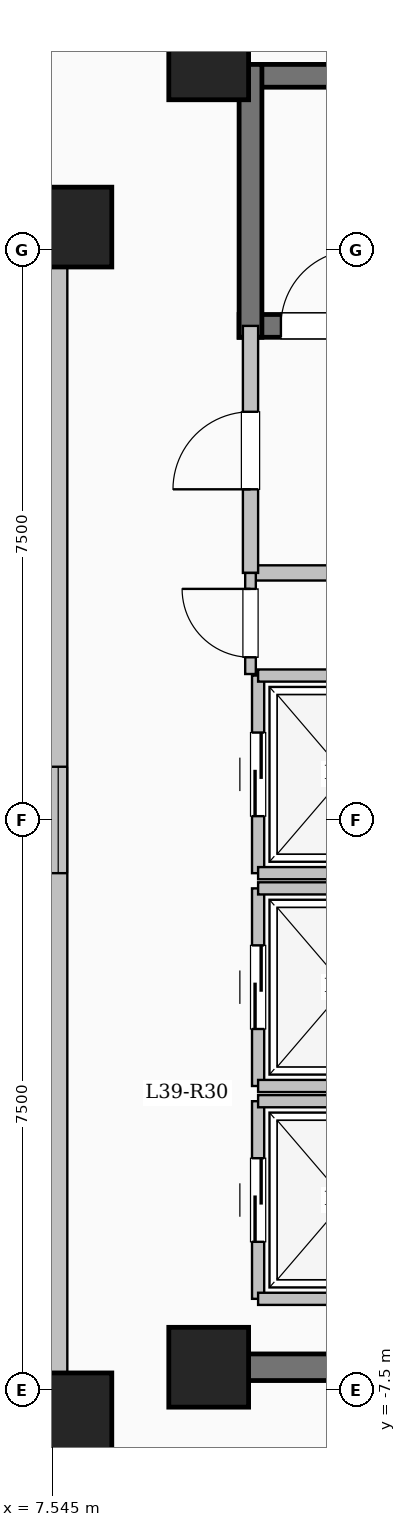
"""IFC4 building model, lengths in metres.
Left out: names, types, materials, properties, quantities, classifications, styles, units other than length and angle.
Written with IfcOpenShell. Run it as: python <this file> out.ifc"""

import sys

from ifc_helpers import new_model, si_unit, direction, frame, frame_2d, origin, origin_2d, place, context, subcontext, project, spatial, rectangle, extrude, element, fill, save


model = new_model("IFC4")
c1 = context("Model", 3, precision=1e-05, world=origin(), true_north=direction((0.0, 1.0)))
c2 = subcontext(c1, "Body", "Model", "MODEL_VIEW")
j1 = project(units=[si_unit("LENGTHUNIT", "METRE"), si_unit("PLANEANGLEUNIT", "RADIAN")], contexts=[c1])
p1 = place(None, origin())
s1 = spatial("IfcSite", under=j1, at=p1, CompositionType="ELEMENT")
p2 = place(p1, origin())
s2 = spatial("IfcBuilding", under=s1, at=p2, CompositionType="ELEMENT")
p3 = place(p2, frame((0.0, 0.0, 146.0)))
s3 = spatial("IfcBuildingStorey", under=s2, at=p3, CompositionType="ELEMENT", Elevation=146.0)
for number, where, z_axis, x_axis in (
    (1, (7.8, -7.8, 0.0), (0.0, 0.0, 1.0), (1.0, 0.0, 0.0)),
    (2, (7.8, 7.8, 0.0), (0.0, 0.0, 1.0), (1.0, 0.0, 0.0)),
    (3, (9.6, -7.2, 0.0), (0.0, 0.0, 1.0), (1.0, 0.0, 0.0)),
    (4, (9.6, 10.0, 0.0), (0.0, 0.0, 1.0), (1.0, 0.0, 0.0)),
):
    element("IfcColumn", number, at=place(p3, frame(where, z_axis=z_axis, x_axis=x_axis)), inside=s3, PredefinedType="COLUMN", context=c2, shape_type="SweptSolid", body=[
        extrude(rectangle(XDim=1.05, YDim=1.05, at=origin_2d()), origin(), (0.0, 0.0, 1.0), 3.35),
    ])
p4 = place(p3, frame((-7.62, -7.62, 0.0), z_axis=(0.0, 0.0, 1.0), x_axis=(1.0, 0.0, 0.0)))
e5 = element("IfcWall", 5, at=p4, inside=s3, PredefinedType="SOLIDWALL", context=c2, shape_type="SweptSolid", body=[
    extrude(rectangle(XDim=15.24, YDim=0.24, at=frame_2d((7.62, 0.0))), origin(), (0.0, 0.0, 1.0), 3.1),
])
p5 = place(p4, frame((6.92, 0.0, 0.95)))
e6 = element("IfcOpeningElement", 6, at=p5, cuts=e5, PredefinedType="OPENING", context=c2, shape_type="SweptSolid", body=[
    extrude(rectangle(XDim=1.4, YDim=1.5, at=frame_2d((0.7, 0.75))), frame((0.0, 0.13, 0.0), z_axis=(0.0, -1.0, 0.0), x_axis=(1.0, 0.0, 0.0)), (0.0, 0.0, 1.0), 0.26),
])
p6 = place(p3, frame((7.62, -7.62, 0.0), z_axis=(0.0, 0.0, 1.0), x_axis=(0.0, 1.0, 0.0)))
e7 = element("IfcWall", 7, at=p6, inside=s3, PredefinedType="SOLIDWALL", context=c2, shape_type="SweptSolid", body=[
    extrude(rectangle(XDim=15.24, YDim=0.24, at=frame_2d((7.62, 0.0))), origin(), (0.0, 0.0, 1.0), 3.1),
])
p7 = place(p6, frame((6.92, 0.0, 0.95)))
e8 = element("IfcOpeningElement", 8, at=p7, cuts=e7, PredefinedType="OPENING", context=c2, shape_type="SweptSolid", body=[
    extrude(rectangle(XDim=1.4, YDim=1.5, at=frame_2d((0.7, 0.75))), frame((0.0, 0.13, 0.0), z_axis=(0.0, -1.0, 0.0), x_axis=(1.0, 0.0, 0.0)), (0.0, 0.0, 1.0), 0.26),
])
p8 = place(p3, frame((7.62, 7.62, 0.0), z_axis=(0.0, 0.0, 1.0), x_axis=(-1.0, 0.0, 0.0)))
e9 = element("IfcWall", 9, at=p8, inside=s3, PredefinedType="SOLIDWALL", context=c2, shape_type="SweptSolid", body=[
    extrude(rectangle(XDim=15.24, YDim=0.24, at=frame_2d((7.62, 0.0))), origin(), (0.0, 0.0, 1.0), 3.1),
])
p9 = place(p8, frame((6.92, 0.0, 0.95)))
e10 = element("IfcOpeningElement", 10, at=p9, cuts=e9, PredefinedType="OPENING", context=c2, shape_type="SweptSolid", body=[
    extrude(rectangle(XDim=1.4, YDim=1.5, at=frame_2d((0.7, 0.75))), frame((0.0, 0.13, 0.0), z_axis=(0.0, -1.0, 0.0), x_axis=(1.0, 0.0, 0.0)), (0.0, 0.0, 1.0), 0.26),
])
p10 = place(p3, frame((10.0, 9.79, 0.0), z_axis=(0.0, 0.0, 1.0), x_axis=(1.0, 0.0, 0.0)))
e11 = element("IfcWall", 11, at=p10, inside=s3, PredefinedType="SHEAR", context=c2, shape_type="SweptSolid", body=[
    extrude(rectangle(XDim=8.0, YDim=0.3, at=frame_2d((4.0, 0.0))), origin(), (0.0, 0.0, 1.0), 3.35),
])
p11 = place(p3, frame((10.0, 6.5, 0.0), z_axis=(0.0, 0.0, 1.0), x_axis=(1.0, 0.0, 0.0)))
e12 = element("IfcWall", 12, at=p11, inside=s3, PredefinedType="SHEAR", context=c2, shape_type="SweptSolid", body=[
    extrude(rectangle(XDim=8.0, YDim=0.3, at=frame_2d((4.0, 0.0))), origin(), (0.0, 0.0, 1.0), 3.35),
])
p12 = place(p11, frame((0.55, 0.0, 0.0)))
e13 = element("IfcOpeningElement", 13, at=p12, cuts=e12, PredefinedType="OPENING", context=c2, shape_type="SweptSolid", body=[
    extrude(rectangle(XDim=1.0, YDim=2.15, at=frame_2d((0.5, 1.075))), frame((0.0, 0.16, 0.0), z_axis=(0.0, -1.0, 0.0), x_axis=(1.0, 0.0, 0.0)), (0.0, 0.0, 1.0), 0.32),
])
p13 = place(p3, frame((10.15, 6.35, 0.0), z_axis=(0.0, 0.0, 1.0), x_axis=(0.0, 1.0, 0.0)))
e14 = element("IfcWall", 14, at=p13, inside=s3, PredefinedType="SHEAR", context=c2, shape_type="SweptSolid", body=[
    extrude(rectangle(XDim=3.59, YDim=0.3, at=frame_2d((1.795, 0.0))), origin(), (0.0, 0.0, 1.0), 3.35),
])
p14 = place(p3, frame((10.15, 3.25, 0.0), z_axis=(0.0, 0.0, 1.0), x_axis=(1.0, 0.0, 0.0)))
e15 = element("IfcWall", 15, at=p14, inside=s3, PredefinedType="SOLIDWALL", context=c2, shape_type="SweptSolid", body=[
    extrude(rectangle(XDim=5.4, YDim=0.2, at=frame_2d((2.7, 0.0))), origin(), (0.0, 0.0, 1.0), 3.1),
])
p15 = place(p3, frame((10.15, 3.25, 0.0), z_axis=(0.0, 0.0, 1.0), x_axis=(0.0, 1.0, 0.0)))
e16 = element("IfcWall", 16, at=p15, inside=s3, PredefinedType="SOLIDWALL", context=c2, shape_type="SweptSolid", body=[
    extrude(rectangle(XDim=3.25, YDim=0.2, at=frame_2d((1.625, 0.0))), origin(), (0.0, 0.0, 1.0), 3.1),
])
p16 = place(p15, frame((1.1, 0.0, 0.0)))
e17 = element("IfcOpeningElement", 17, at=p16, cuts=e16, PredefinedType="OPENING", context=c2, shape_type="SweptSolid", body=[
    extrude(rectangle(XDim=1.02, YDim=2.15, at=frame_2d((0.51, 1.075))), frame((0.0, 0.11, 0.0), z_axis=(0.0, -1.0, 0.0), x_axis=(1.0, 0.0, 0.0)), (0.0, 0.0, 1.0), 0.22),
])
p17 = place(p3, frame((10.25, -6.3, 0.0), z_axis=(0.0, 0.0, 1.0), x_axis=(0.0, 1.0, 0.0)))
e18 = element("IfcWall", 18, at=p17, inside=s3, PredefinedType="SOLIDWALL", context=c2, shape_type="SweptSolid", body=[
    extrude(rectangle(XDim=2.6, YDim=0.16, at=frame_2d((1.3, 0.0))), origin(), (0.0, 0.0, 1.0), 3.1),
])
p18 = place(p17, frame((0.75, 0.0, 0.0)))
e19 = element("IfcOpeningElement", 19, at=p18, cuts=e18, PredefinedType="OPENING", context=c2, shape_type="SweptSolid", body=[
    extrude(rectangle(XDim=1.1, YDim=2.15, at=frame_2d((0.55, 1.075))), frame((0.0, 0.09, 0.0), z_axis=(0.0, -1.0, 0.0), x_axis=(1.0, 0.0, 0.0)), (0.0, 0.0, 1.0), 0.18),
])
for number, where, z_axis, x_axis in (
    (20, (10.25, -6.3, 0.0), (0.0, 0.0, 1.0), (1.0, 0.0, 0.0)),
    (21, (10.25, -3.7, 0.0), (0.0, 0.0, 1.0), (1.0, 0.0, 0.0)),
):
    element("IfcWall", number, at=place(p3, frame(where, z_axis=z_axis, x_axis=x_axis)), inside=s3, PredefinedType="SOLIDWALL", context=c2, shape_type="SweptSolid", body=[
        extrude(rectangle(XDim=2.3, YDim=0.16, at=frame_2d((1.15, 0.0))), origin(), (0.0, 0.0, 1.0), 3.1),
    ])
p19 = place(p3, frame((10.25, -3.5, 0.0), z_axis=(0.0, 0.0, 1.0), x_axis=(0.0, 1.0, 0.0)))
e22 = element("IfcWall", 22, at=p19, inside=s3, PredefinedType="SOLIDWALL", context=c2, shape_type="SweptSolid", body=[
    extrude(rectangle(XDim=2.6, YDim=0.16, at=frame_2d((1.3, 0.0))), origin(), (0.0, 0.0, 1.0), 3.1),
])
p20 = place(p19, frame((0.75, 0.0, 0.0)))
e23 = element("IfcOpeningElement", 23, at=p20, cuts=e22, PredefinedType="OPENING", context=c2, shape_type="SweptSolid", body=[
    extrude(rectangle(XDim=1.1, YDim=2.15, at=frame_2d((0.55, 1.075))), frame((0.0, 0.09, 0.0), z_axis=(0.0, -1.0, 0.0), x_axis=(1.0, 0.0, 0.0)), (0.0, 0.0, 1.0), 0.18),
])
for number, where, z_axis, x_axis in (
    (24, (10.25, -3.5, 0.0), (0.0, 0.0, 1.0), (1.0, 0.0, 0.0)),
    (25, (10.25, -0.9, 0.0), (0.0, 0.0, 1.0), (1.0, 0.0, 0.0)),
):
    element("IfcWall", number, at=place(p3, frame(where, z_axis=z_axis, x_axis=x_axis)), inside=s3, PredefinedType="SOLIDWALL", context=c2, shape_type="SweptSolid", body=[
        extrude(rectangle(XDim=2.3, YDim=0.16, at=frame_2d((1.15, 0.0))), origin(), (0.0, 0.0, 1.0), 3.1),
    ])
p21 = place(p3, frame((10.25, -0.7, 0.0), z_axis=(0.0, 0.0, 1.0), x_axis=(0.0, 1.0, 0.0)))
e26 = element("IfcWall", 26, at=p21, inside=s3, PredefinedType="SOLIDWALL", context=c2, shape_type="SweptSolid", body=[
    extrude(rectangle(XDim=2.6, YDim=0.16, at=frame_2d((1.3, 0.0))), origin(), (0.0, 0.0, 1.0), 3.1),
])
p22 = place(p21, frame((0.75, 0.0, 0.0)))
e27 = element("IfcOpeningElement", 27, at=p22, cuts=e26, PredefinedType="OPENING", context=c2, shape_type="SweptSolid", body=[
    extrude(rectangle(XDim=1.1, YDim=2.15, at=frame_2d((0.55, 1.075))), frame((0.0, 0.09, 0.0), z_axis=(0.0, -1.0, 0.0), x_axis=(1.0, 0.0, 0.0)), (0.0, 0.0, 1.0), 0.18),
])
for number, where, z_axis, x_axis in (
    (28, (10.25, -0.7, 0.0), (0.0, 0.0, 1.0), (1.0, 0.0, 0.0)),
    (29, (10.25, 1.9, 0.0), (0.0, 0.0, 1.0), (1.0, 0.0, 0.0)),
):
    element("IfcWall", number, at=place(p3, frame(where, z_axis=z_axis, x_axis=x_axis)), inside=s3, PredefinedType="SOLIDWALL", context=c2, shape_type="SweptSolid", body=[
        extrude(rectangle(XDim=2.3, YDim=0.16, at=frame_2d((1.15, 0.0))), origin(), (0.0, 0.0, 1.0), 3.1),
    ])
p23 = place(p3, frame((10.075, -7.2, 0.0), z_axis=(0.0, 0.0, 1.0), x_axis=(1.0, 0.0, 0.0)))
e30 = element("IfcWall", 30, at=p23, inside=s3, PredefinedType="SHEAR", context=c2, shape_type="SweptSolid", body=[
    extrude(rectangle(XDim=8.55, YDim=0.35, at=frame_2d((4.275, 0.0))), origin(), (0.0, 0.0, 1.0), 3.35),
])
p24 = place(p3, frame((10.15, 1.92, 0.0), z_axis=(0.0, 0.0, 1.0), x_axis=(0.0, 1.0, 0.0)))
e31 = element("IfcWall", 31, at=p24, inside=s3, PredefinedType="PARTITIONING", context=c2, shape_type="SweptSolid", body=[
    extrude(rectangle(XDim=1.33, YDim=0.14, at=frame_2d((0.665, 0.0))), origin(), (0.0, 0.0, 1.0), 3.1),
])
p25 = place(p24, frame((0.22, 0.0, 0.0)))
e32 = element("IfcOpeningElement", 32, at=p25, cuts=e31, PredefinedType="OPENING", context=c2, shape_type="SweptSolid", body=[
    extrude(rectangle(XDim=0.9, YDim=2.08, at=frame_2d((0.45, 1.04))), frame((0.0, 0.08, 0.0), z_axis=(0.0, -1.0, 0.0), x_axis=(1.0, 0.0, 0.0)), (0.0, 0.0, 1.0), 0.16),
])
p26 = place(p7, origin())
e33 = element("IfcWindow", 33, at=p26, inside=s3, PartitioningType="SINGLE_PANEL", PredefinedType="WINDOW", context=c2, shape_type="SweptSolid", body=[
    extrude(rectangle(XDim=1.4, YDim=1.5, at=frame_2d((0.7, 0.75))), frame((0.0, 0.03, 0.0), z_axis=(0.0, -1.0, 0.0), x_axis=(1.0, 0.0, 0.0)), (0.0, 0.0, 1.0), 0.06),
])
fill(e8, e33)
p27 = place(p12, origin())
e34 = element("IfcDoor", 34, at=p27, inside=s3, OperationType="SINGLE_SWING_RIGHT", PredefinedType="DOOR", context=c2, shape_type="SweptSolid", body=[
    extrude(rectangle(XDim=1.0, YDim=2.15, at=frame_2d((0.5, 1.075))), frame((0.0, 0.025, 0.0), z_axis=(0.0, -1.0, 0.0), x_axis=(1.0, 0.0, 0.0)), (0.0, 0.0, 1.0), 0.05),
])
fill(e13, e34)
p28 = place(p16, origin())
e35 = element("IfcDoor", 35, at=p28, inside=s3, OperationType="SINGLE_SWING_LEFT", PredefinedType="DOOR", context=c2, shape_type="SweptSolid", body=[
    extrude(rectangle(XDim=1.02, YDim=2.15, at=frame_2d((0.51, 1.075))), frame((0.0, 0.025, 0.0), z_axis=(0.0, -1.0, 0.0), x_axis=(1.0, 0.0, 0.0)), (0.0, 0.0, 1.0), 0.05),
])
fill(e17, e35)
p29 = place(p18, origin())
e36 = element("IfcDoor", 36, at=p29, inside=s3, OperationType="SLIDING_TO_LEFT", PredefinedType="DOOR", context=c2, shape_type="SweptSolid", body=[
    extrude(rectangle(XDim=1.1, YDim=2.15, at=frame_2d((0.55, 1.075))), frame((0.0, 0.025, 0.0), z_axis=(0.0, -1.0, 0.0), x_axis=(1.0, 0.0, 0.0)), (0.0, 0.0, 1.0), 0.05),
])
fill(e19, e36)
p30 = place(p20, origin())
e37 = element("IfcDoor", 37, at=p30, inside=s3, OperationType="SLIDING_TO_LEFT", PredefinedType="DOOR", context=c2, shape_type="SweptSolid", body=[
    extrude(rectangle(XDim=1.1, YDim=2.15, at=frame_2d((0.55, 1.075))), frame((0.0, 0.025, 0.0), z_axis=(0.0, -1.0, 0.0), x_axis=(1.0, 0.0, 0.0)), (0.0, 0.0, 1.0), 0.05),
])
fill(e23, e37)
p31 = place(p22, origin())
e38 = element("IfcDoor", 38, at=p31, inside=s3, OperationType="SLIDING_TO_LEFT", PredefinedType="DOOR", context=c2, shape_type="SweptSolid", body=[
    extrude(rectangle(XDim=1.1, YDim=2.15, at=frame_2d((0.55, 1.075))), frame((0.0, 0.025, 0.0), z_axis=(0.0, -1.0, 0.0), x_axis=(1.0, 0.0, 0.0)), (0.0, 0.0, 1.0), 0.05),
])
fill(e27, e38)
p32 = place(p25, origin())
e39 = element("IfcDoor", 39, at=p32, inside=s3, OperationType="SINGLE_SWING_RIGHT", PredefinedType="DOOR", context=c2, shape_type="SweptSolid", body=[
    extrude(rectangle(XDim=0.9, YDim=2.08, at=frame_2d((0.45, 1.04))), frame((0.0, 0.025, 0.0), z_axis=(0.0, -1.0, 0.0), x_axis=(1.0, 0.0, 0.0)), (0.0, 0.0, 1.0), 0.05),
])
fill(e32, e39)
save(model, sys.argv[1])
